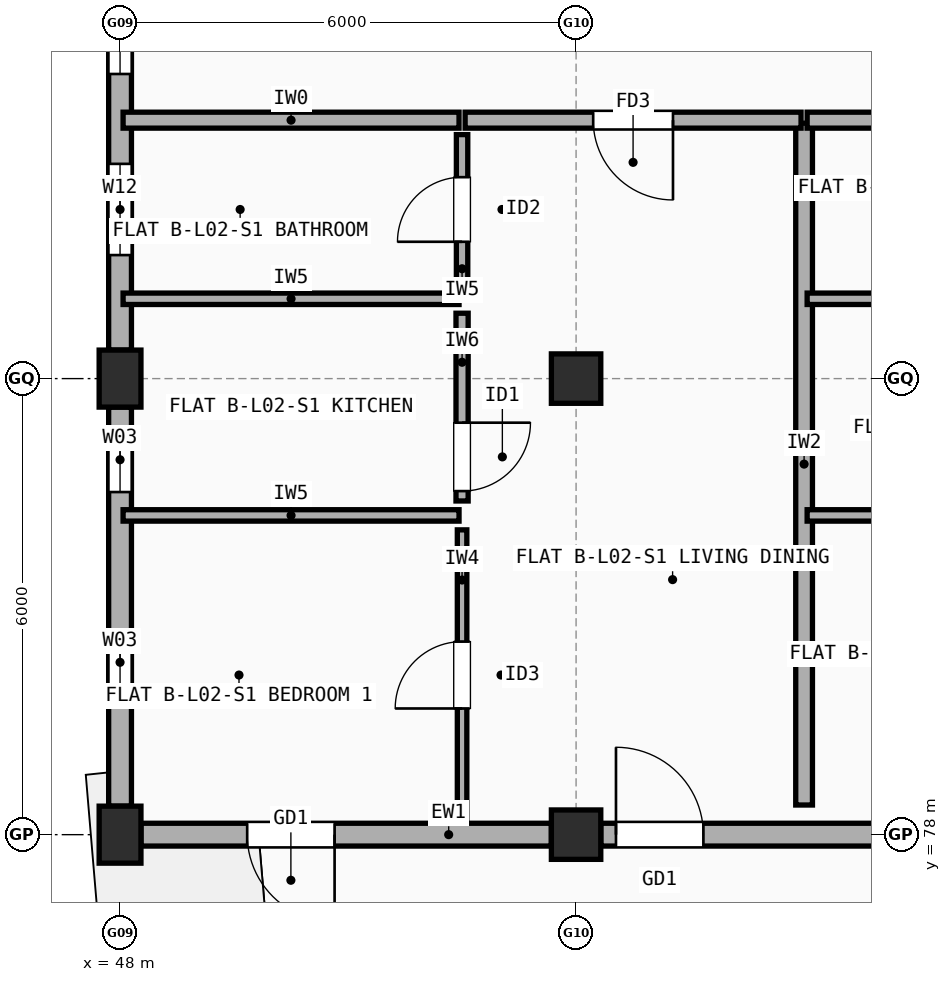
"""IFC4 building model, lengths in metres.
Left out: names, types, materials, properties, quantities, classifications, styles, units other than length and angle.
Written with IfcOpenShell. Run it as: python <this file> out.ifc"""

import sys

from ifc_helpers import new_model, si_unit, direction, frame, frame_2d, origin, origin_2d, place, context, subcontext, project, spatial, rectangle, extrude, element, fill, save


model = new_model("IFC4")
c1 = context("Model", 3, precision=1e-05, world=origin(), true_north=direction((0.0, 1.0)))
c2 = subcontext(c1, "Body", "Model", "MODEL_VIEW")
j1 = project(units=[si_unit("LENGTHUNIT", "METRE"), si_unit("PLANEANGLEUNIT", "RADIAN")], contexts=[c1])
p1 = place(None, origin())
s1 = spatial("IfcSite", under=j1, at=p1, CompositionType="ELEMENT")
p2 = place(p1, origin())
s2 = spatial("IfcBuilding", under=s1, at=p2, CompositionType="ELEMENT")
p3 = place(p2, frame((0.0, 0.0, 7.7)))
s3 = spatial("IfcBuildingStorey", under=s2, at=p3, CompositionType="ELEMENT", Elevation=7.7)
for number, where, z_axis, x_axis in (
    (1, (48.0, 78.0, 0.0), (0.0, 0.0, 1.0), (1.0, 0.0, 0.0)),
    (2, (48.0, 84.0, 0.0), (0.0, 0.0, 1.0), (1.0, 0.0, 0.0)),
):
    element("IfcColumn", number, at=place(p3, frame(where, z_axis=z_axis, x_axis=x_axis)), inside=s3, PredefinedType="COLUMN", context=c2, shape_type="SweptSolid", body=[
        extrude(rectangle(XDim=0.55, YDim=0.75, at=origin_2d()), origin(), (0.0, 0.0, 1.0), 2.955),
    ])
for number, where, z_axis, x_axis in (
    (3, (54.0, 78.0, 0.0), (0.0, 0.0, 1.0), (1.0, 0.0, 0.0)),
    (4, (54.0, 84.0, 0.0), (0.0, 0.0, 1.0), (1.0, 0.0, 0.0)),
):
    element("IfcColumn", number, at=place(p3, frame(where, z_axis=z_axis, x_axis=x_axis)), inside=s3, PredefinedType="COLUMN", context=c2, shape_type="SweptSolid", body=[
        extrude(rectangle(XDim=0.65, YDim=0.65, at=origin_2d()), origin(), (0.0, 0.0, 1.0), 2.955),
    ])
p4 = place(p3, frame((48.275, 78.0, 0.0), z_axis=(0.0, 0.0, 1.0), x_axis=(1.0, 0.0, 0.0)))
e5 = element("IfcWall", 5, at=p4, inside=s3, PredefinedType="STANDARD", context=c2, shape_type="SweptSolid", body=[
    extrude(rectangle(XDim=5.4, YDim=0.3, at=frame_2d((2.7, 0.0))), origin(), (0.0, 0.0, 1.0), 2.437),
])
p5 = place(p4, frame((1.398, 0.0, 0.0)))
e6 = element("IfcOpeningElement", 6, at=p5, cuts=e5, PredefinedType="OPENING", context=c2, shape_type="SweptSolid", body=[
    extrude(rectangle(XDim=1.15, YDim=2.15, at=frame_2d((0.575, 1.075))), frame((0.0, 0.16, 0.0), z_axis=(0.0, -1.0, 0.0), x_axis=(1.0, 0.0, 0.0)), (0.0, 0.0, 1.0), 0.32),
])
p6 = place(p3, frame((54.325, 78.0, 0.0), z_axis=(0.0, 0.0, 1.0), x_axis=(1.0, 0.0, 0.0)))
e7 = element("IfcWall", 7, at=p6, inside=s3, PredefinedType="STANDARD", context=c2, shape_type="SweptSolid", body=[
    extrude(rectangle(XDim=5.35, YDim=0.3, at=frame_2d((2.675, 0.0))), origin(), (0.0, 0.0, 1.0), 2.437),
])
p7 = place(p6, frame((0.2, 0.0, 0.0)))
e8 = element("IfcOpeningElement", 8, at=p7, cuts=e7, PredefinedType="OPENING", context=c2, shape_type="SweptSolid", body=[
    extrude(rectangle(XDim=1.15, YDim=2.15, at=frame_2d((0.575, 1.075))), frame((0.0, 0.16, 0.0), z_axis=(0.0, -1.0, 0.0), x_axis=(1.0, 0.0, 0.0)), (0.0, 0.0, 1.0), 0.32),
])
p8 = place(p6, frame((3.583, 0.0, 0.9)))
e9 = element("IfcOpeningElement", 9, at=p8, cuts=e7, PredefinedType="OPENING", context=c2, shape_type="SweptSolid", body=[
    extrude(rectangle(XDim=0.9, YDim=1.3, at=frame_2d((0.45, 0.65))), frame((0.0, 0.16, 0.0), z_axis=(0.0, -1.0, 0.0), x_axis=(1.0, 0.0, 0.0)), (0.0, 0.0, 1.0), 0.32),
])
p9 = place(p3, frame((48.0, 89.625, 0.0), z_axis=(0.0, 0.0, 1.0), x_axis=(0.0, -1.0, 0.0)))
e10 = element("IfcWall", 10, at=p9, inside=s3, PredefinedType="STANDARD", context=c2, shape_type="SweptSolid", body=[
    extrude(rectangle(XDim=5.25, YDim=0.3, at=frame_2d((2.625, 0.0))), origin(), (0.0, 0.0, 1.0), 2.437),
])
p10 = place(p9, frame((0.567, 0.0, 0.9)))
e11 = element("IfcOpeningElement", 11, at=p10, cuts=e10, PredefinedType="OPENING", context=c2, shape_type="SweptSolid", body=[
    extrude(rectangle(XDim=1.05, YDim=1.35, at=frame_2d((0.525, 0.675))), frame((0.0, 0.16, 0.0), z_axis=(0.0, -1.0, 0.0), x_axis=(1.0, 0.0, 0.0)), (0.0, 0.0, 1.0), 0.32),
])
p11 = place(p9, frame((2.8, 0.0, 0.9)))
e12 = element("IfcOpeningElement", 12, at=p11, cuts=e10, PredefinedType="OPENING", context=c2, shape_type="SweptSolid", body=[
    extrude(rectangle(XDim=1.2, YDim=1.35, at=frame_2d((0.6, 0.675))), frame((0.0, 0.16, 0.0), z_axis=(0.0, -1.0, 0.0), x_axis=(1.0, 0.0, 0.0)), (0.0, 0.0, 1.0), 0.32),
])
p12 = place(p3, frame((48.0, 83.625, 0.0), z_axis=(0.0, 0.0, 1.0), x_axis=(0.0, -1.0, 0.0)))
e13 = element("IfcWall", 13, at=p12, inside=s3, PredefinedType="STANDARD", context=c2, shape_type="SweptSolid", body=[
    extrude(rectangle(XDim=5.25, YDim=0.3, at=frame_2d((2.625, 0.0))), origin(), (0.0, 0.0, 1.0), 2.437),
])
p13 = place(p12, frame((0.268, 0.0, 0.9)))
e14 = element("IfcOpeningElement", 14, at=p13, cuts=e13, PredefinedType="OPENING", context=c2, shape_type="SweptSolid", body=[
    extrude(rectangle(XDim=0.85, YDim=1.25, at=frame_2d((0.425, 0.625))), frame((0.0, 0.16, 0.0), z_axis=(0.0, -1.0, 0.0), x_axis=(1.0, 0.0, 0.0)), (0.0, 0.0, 1.0), 0.32),
])
p14 = place(p12, frame((2.933, 0.0, 0.9)))
e15 = element("IfcOpeningElement", 15, at=p14, cuts=e13, PredefinedType="OPENING", context=c2, shape_type="SweptSolid", body=[
    extrude(rectangle(XDim=0.85, YDim=1.25, at=frame_2d((0.425, 0.625))), frame((0.0, 0.16, 0.0), z_axis=(0.0, -1.0, 0.0), x_axis=(1.0, 0.0, 0.0)), (0.0, 0.0, 1.0), 0.32),
])
p15 = place(p3, frame((57.0, 78.39, 0.0), z_axis=(0.0, 0.0, 1.0), x_axis=(0.0, 1.0, 0.0)))
e16 = element("IfcWall", 16, at=p15, inside=s3, PredefinedType="SOLIDWALL", context=c2, shape_type="SweptSolid", body=[
    extrude(rectangle(XDim=8.97, YDim=0.22, at=frame_2d((4.485, 0.0))), origin(), (0.0, 0.0, 1.0), 2.437),
])
p16 = place(p3, frame((48.04, 87.4, 0.0), z_axis=(0.0, 0.0, 1.0), x_axis=(1.0, 0.0, 0.0)))
e17 = element("IfcWall", 17, at=p16, inside=s3, PredefinedType="SOLIDWALL", context=c2, shape_type="SweptSolid", body=[
    extrude(rectangle(XDim=4.42, YDim=0.21, at=frame_2d((2.21, 0.0))), origin(), (0.0, 0.0, 1.0), 2.437),
])
p17 = place(p3, frame((52.54, 87.4, 0.0), z_axis=(0.0, 0.0, 1.0), x_axis=(1.0, 0.0, 0.0)))
e18 = element("IfcWall", 18, at=p17, inside=s3, PredefinedType="SOLIDWALL", context=c2, shape_type="SweptSolid", body=[
    extrude(rectangle(XDim=4.42, YDim=0.21, at=frame_2d((2.21, 0.0))), origin(), (0.0, 0.0, 1.0), 2.337),
])
p18 = place(p17, frame((1.685, 0.0, 0.0)))
e19 = element("IfcOpeningElement", 19, at=p18, cuts=e18, PredefinedType="OPENING", context=c2, shape_type="SweptSolid", body=[
    extrude(rectangle(XDim=1.05, YDim=2.15, at=frame_2d((0.525, 1.075))), frame((0.0, 0.115, 0.0), z_axis=(0.0, -1.0, 0.0), x_axis=(1.0, 0.0, 0.0)), (0.0, 0.0, 1.0), 0.23),
])
p19 = place(p3, frame((52.5, 78.19, 0.0), z_axis=(0.0, 0.0, 1.0), x_axis=(0.0, 1.0, 0.0)))
e20 = element("IfcWall", 20, at=p19, inside=s3, PredefinedType="PARTITIONING", context=c2, shape_type="SweptSolid", body=[
    extrude(rectangle(XDim=3.82, YDim=0.125, at=frame_2d((1.91, 0.0))), origin(), (0.0, 0.0, 1.0), 2.955),
])
p20 = place(p19, frame((1.47, 0.0, 0.0)))
e21 = element("IfcOpeningElement", 21, at=p20, cuts=e20, PredefinedType="OPENING", context=c2, shape_type="SweptSolid", body=[
    extrude(rectangle(XDim=0.88, YDim=2.1, at=frame_2d((0.44, 1.05))), frame((0.0, 0.073, 0.0), z_axis=(0.0, -1.0, 0.0), x_axis=(1.0, 0.0, 0.0)), (0.0, 0.0, 1.0), 0.145),
])
p21 = place(p3, frame((52.5, 82.39, 0.0), z_axis=(0.0, 0.0, 1.0), x_axis=(0.0, 1.0, 0.0)))
e22 = element("IfcWall", 22, at=p21, inside=s3, PredefinedType="PLUMBINGWALL", context=c2, shape_type="SweptSolid", body=[
    extrude(rectangle(XDim=2.47, YDim=0.16, at=frame_2d((1.235, 0.0))), origin(), (0.0, 0.0, 1.0), 2.437),
])
p22 = place(p21, frame((0.13, 0.0, 0.0)))
e23 = element("IfcOpeningElement", 23, at=p22, cuts=e22, PredefinedType="OPENING", context=c2, shape_type="SweptSolid", body=[
    extrude(rectangle(XDim=0.9, YDim=2.1, at=frame_2d((0.45, 1.05))), frame((0.0, 0.09, 0.0), z_axis=(0.0, -1.0, 0.0), x_axis=(1.0, 0.0, 0.0)), (0.0, 0.0, 1.0), 0.18),
])
p23 = place(p3, frame((52.5, 85.24, 0.0), z_axis=(0.0, 0.0, 1.0), x_axis=(0.0, 1.0, 0.0)))
e24 = element("IfcWall", 24, at=p23, inside=s3, PredefinedType="PARTITIONING", context=c2, shape_type="SweptSolid", body=[
    extrude(rectangle(XDim=1.97, YDim=0.15, at=frame_2d((0.985, 0.0))), origin(), (0.0, 0.0, 1.0), 2.955),
])
p24 = place(p23, frame((0.56, 0.0, 0.0)))
e25 = element("IfcOpeningElement", 25, at=p24, cuts=e24, PredefinedType="OPENING", context=c2, shape_type="SweptSolid", body=[
    extrude(rectangle(XDim=0.85, YDim=2.1, at=frame_2d((0.425, 1.05))), frame((0.0, 0.085, 0.0), z_axis=(0.0, -1.0, 0.0), x_axis=(1.0, 0.0, 0.0)), (0.0, 0.0, 1.0), 0.17),
])
for number, where, z_axis, x_axis in (
    (26, (48.04, 82.2, 0.0), (0.0, 0.0, 1.0), (1.0, 0.0, 0.0)),
    (27, (48.04, 85.05, 0.0), (0.0, 0.0, 1.0), (1.0, 0.0, 0.0)),
):
    element("IfcWall", number, at=place(p3, frame(where, z_axis=z_axis, x_axis=x_axis)), inside=s3, PredefinedType="PARTITIONING", context=c2, shape_type="SweptSolid", body=[
        extrude(rectangle(XDim=4.42, YDim=0.15, at=frame_2d((2.21, 0.0))), origin(), (0.0, 0.0, 1.0), 2.437),
    ])
p25 = place(p3, frame((57.04, 87.4, 0.0), z_axis=(0.0, 0.0, 1.0), x_axis=(1.0, 0.0, 0.0)))
e28 = element("IfcWall", 28, at=p25, inside=s3, PredefinedType="SOLIDWALL", context=c2, shape_type="SweptSolid", body=[
    extrude(rectangle(XDim=4.42, YDim=0.21, at=frame_2d((2.21, 0.0))), origin(), (0.0, 0.0, 1.0), 2.337),
])
for number, where, z_axis, x_axis in (
    (29, (57.04, 82.2, 0.0), (0.0, 0.0, 1.0), (1.0, 0.0, 0.0)),
    (30, (57.04, 85.05, 0.0), (0.0, 0.0, 1.0), (1.0, 0.0, 0.0)),
):
    element("IfcWall", number, at=place(p3, frame(where, z_axis=z_axis, x_axis=x_axis)), inside=s3, PredefinedType="PARTITIONING", context=c2, shape_type="SweptSolid", body=[
        extrude(rectangle(XDim=4.42, YDim=0.15, at=frame_2d((2.21, 0.0))), origin(), (0.0, 0.0, 1.0), 2.337),
    ])
p26 = place(p5, frame((1.15, 0.0, 0.0), z_axis=(0.0, 0.0, 1.0), x_axis=(-1.0, 0.0, 0.0)))
e31 = element("IfcDoor", 31, at=p26, inside=s3, OperationType="SINGLE_SWING_RIGHT", PredefinedType="DOOR", context=c2, shape_type="SweptSolid", body=[
    extrude(rectangle(XDim=1.15, YDim=2.15, at=frame_2d((0.575, 1.075))), frame((0.0, 0.025, 0.0), z_axis=(0.0, -1.0, 0.0), x_axis=(1.0, 0.0, 0.0)), (0.0, 0.0, 1.0), 0.05),
])
fill(e6, e31)
p27 = place(p7, frame((1.15, 0.0, 0.0), z_axis=(0.0, 0.0, 1.0), x_axis=(-1.0, 0.0, 0.0)))
e32 = element("IfcDoor", 32, at=p27, inside=s3, OperationType="SINGLE_SWING_LEFT", PredefinedType="DOOR", context=c2, shape_type="SweptSolid", body=[
    extrude(rectangle(XDim=1.15, YDim=2.15, at=frame_2d((0.575, 1.075))), frame((0.0, 0.025, 0.0), z_axis=(0.0, -1.0, 0.0), x_axis=(1.0, 0.0, 0.0)), (0.0, 0.0, 1.0), 0.05),
])
fill(e8, e32)
p28 = place(p10, origin())
e33 = element("IfcWindow", 33, at=p28, inside=s3, PartitioningType="SINGLE_PANEL", PredefinedType="WINDOW", context=c2, shape_type="SweptSolid", body=[
    extrude(rectangle(XDim=1.05, YDim=1.35, at=frame_2d((0.525, 0.675))), frame((0.0, 0.03, 0.0), z_axis=(0.0, -1.0, 0.0), x_axis=(1.0, 0.0, 0.0)), (0.0, 0.0, 1.0), 0.06),
])
fill(e11, e33)
p29 = place(p11, origin())
e34 = element("IfcWindow", 34, at=p29, inside=s3, PartitioningType="SINGLE_PANEL", PredefinedType="WINDOW", context=c2, shape_type="SweptSolid", body=[
    extrude(rectangle(XDim=1.2, YDim=1.35, at=frame_2d((0.6, 0.675))), frame((0.0, 0.03, 0.0), z_axis=(0.0, -1.0, 0.0), x_axis=(1.0, 0.0, 0.0)), (0.0, 0.0, 1.0), 0.06),
])
fill(e12, e34)
p30 = place(p13, origin())
e35 = element("IfcWindow", 35, at=p30, inside=s3, PartitioningType="SINGLE_PANEL", PredefinedType="WINDOW", context=c2, shape_type="SweptSolid", body=[
    extrude(rectangle(XDim=0.85, YDim=1.25, at=frame_2d((0.425, 0.625))), frame((0.0, 0.03, 0.0), z_axis=(0.0, -1.0, 0.0), x_axis=(1.0, 0.0, 0.0)), (0.0, 0.0, 1.0), 0.06),
])
fill(e14, e35)
p31 = place(p14, origin())
e36 = element("IfcWindow", 36, at=p31, inside=s3, PartitioningType="SINGLE_PANEL", PredefinedType="WINDOW", context=c2, shape_type="SweptSolid", body=[
    extrude(rectangle(XDim=0.85, YDim=1.25, at=frame_2d((0.425, 0.625))), frame((0.0, 0.03, 0.0), z_axis=(0.0, -1.0, 0.0), x_axis=(1.0, 0.0, 0.0)), (0.0, 0.0, 1.0), 0.06),
])
fill(e15, e36)
p32 = place(p18, origin())
e37 = element("IfcDoor", 37, at=p32, inside=s3, OperationType="SINGLE_SWING_RIGHT", PredefinedType="DOOR", context=c2, shape_type="SweptSolid", body=[
    extrude(rectangle(XDim=1.05, YDim=2.15, at=frame_2d((0.525, 1.075))), frame((0.0, 0.025, 0.0), z_axis=(0.0, -1.0, 0.0), x_axis=(1.0, 0.0, 0.0)), (0.0, 0.0, 1.0), 0.05),
])
fill(e19, e37)
p33 = place(p20, origin())
e38 = element("IfcDoor", 38, at=p33, inside=s3, OperationType="SINGLE_SWING_LEFT", PredefinedType="DOOR", context=c2, shape_type="SweptSolid", body=[
    extrude(rectangle(XDim=0.88, YDim=2.1, at=frame_2d((0.44, 1.05))), frame((0.0, 0.025, 0.0), z_axis=(0.0, -1.0, 0.0), x_axis=(1.0, 0.0, 0.0)), (0.0, 0.0, 1.0), 0.05),
])
fill(e21, e38)
p34 = place(p22, origin())
e39 = element("IfcDoor", 39, at=p34, inside=s3, OperationType="SINGLE_SWING_RIGHT", PredefinedType="DOOR", context=c2, shape_type="SweptSolid", body=[
    extrude(rectangle(XDim=0.9, YDim=2.1, at=frame_2d((0.45, 1.05))), frame((0.0, 0.025, 0.0), z_axis=(0.0, -1.0, 0.0), x_axis=(1.0, 0.0, 0.0)), (0.0, 0.0, 1.0), 0.05),
])
fill(e23, e39)
p35 = place(p24, origin())
e40 = element("IfcDoor", 40, at=p35, inside=s3, OperationType="SINGLE_SWING_LEFT", PredefinedType="DOOR", context=c2, shape_type="SweptSolid", body=[
    extrude(rectangle(XDim=0.85, YDim=2.1, at=frame_2d((0.425, 1.05))), frame((0.0, 0.025, 0.0), z_axis=(0.0, -1.0, 0.0), x_axis=(1.0, 0.0, 0.0)), (0.0, 0.0, 1.0), 0.05),
])
fill(e25, e40)
save(model, sys.argv[1])
